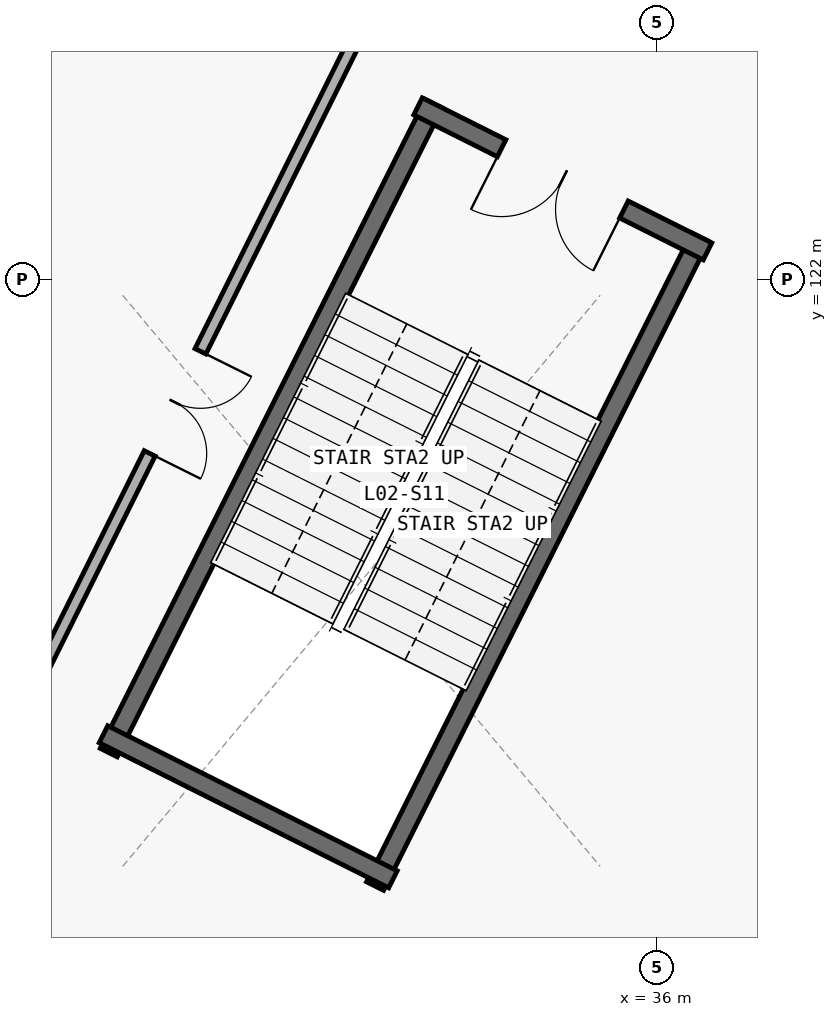
"""IFC4 building model, lengths in metres.
Left out: names, types, materials, properties, quantities, classifications, styles, units other than length and angle.
Written with IfcOpenShell. Run it as: python <this file> out.ifc"""

import sys

from ifc_helpers import new_model, si_unit, direction, frame, frame_2d, origin, place, context, subcontext, project, spatial, rectangle, extrude, element, fill, save


model = new_model("IFC4")
c1 = context("Model", 3, precision=1e-05, world=origin(), true_north=direction((0.0, 1.0)))
c2 = subcontext(c1, "Body", "Model", "MODEL_VIEW")
j1 = project(units=[si_unit("LENGTHUNIT", "METRE"), si_unit("PLANEANGLEUNIT", "RADIAN")], contexts=[c1])
p1 = place(None, origin())
s1 = spatial("IfcSite", under=j1, at=p1, CompositionType="ELEMENT")
p2 = place(p1, origin())
s2 = spatial("IfcBuilding", under=s1, at=p2, CompositionType="ELEMENT")
p3 = place(p2, frame((0.0, 0.0, 10.2)))
s3 = spatial("IfcBuildingStorey", under=s2, at=p3, CompositionType="ELEMENT", Elevation=10.2)
p4 = place(p3, frame((33.063, 124.313, 0.0), z_axis=(0.0, 0.0, 1.0), x_axis=(-0.447919041961, -0.894074119885, 0.0)))
e1 = element("IfcWall", 1, at=p4, inside=s3, PredefinedType="SHEAR", context=c2, shape_type="SweptSolid", body=[
    extrude(rectangle(XDim=9.55, YDim=0.25, at=frame_2d((4.775, 0.0))), origin(), (0.0, 0.0, 1.0), 4.5),
])
p5 = place(p3, frame((32.291, 114.019, 0.0), z_axis=(0.0, 0.0, 1.0), x_axis=(0.4479088042, 0.894079248792, 0.0)))
e2 = element("IfcWall", 2, at=p5, inside=s3, PredefinedType="SHEAR", context=c2, shape_type="SweptSolid", body=[
    extrude(rectangle(XDim=9.55, YDim=0.25, at=frame_2d((4.775, 0.0))), origin(), (0.0, 0.0, 1.0), 4.5),
])
p6 = place(p3, frame((36.664, 122.37, 0.0), z_axis=(0.0, 0.0, 1.0), x_axis=(-0.894071595331, 0.447924081092, 0.0)))
e3 = element("IfcWall", 3, at=p6, inside=s3, PredefinedType="SHEAR", context=c2, shape_type="SweptSolid", body=[
    extrude(rectangle(XDim=4.26, YDim=0.25, at=frame_2d((2.13, 0.0))), origin(), (0.0, 0.0, 1.0), 4.5),
])
p7 = place(p6, frame((1.23, 0.0, 0.0)))
e4 = element("IfcOpeningElement", 4, at=p7, cuts=e3, PredefinedType="OPENING", context=c2, shape_type="SweptSolid", body=[
    extrude(rectangle(XDim=1.8, YDim=2.25, at=frame_2d((0.9, 1.125))), frame((0.0, 0.135, 0.0), z_axis=(0.0, -1.0, 0.0), x_axis=(1.0, 0.0, 0.0)), (0.0, 0.0, 1.0), 0.27),
])
p8 = place(p3, frame((28.717, 116.016, 0.0), z_axis=(0.0, 0.0, 1.0), x_axis=(0.894083048484, -0.447901219481, 0.0)))
e5 = element("IfcWall", 5, at=p8, inside=s3, PredefinedType="SHEAR", context=c2, shape_type="SweptSolid", body=[
    extrude(rectangle(XDim=4.26, YDim=0.25, at=frame_2d((2.13, 0.0))), origin(), (0.0, 0.0, 1.0), 4.5),
])
p9 = place(p3, frame((33.934, 128.982, 0.0), z_axis=(0.0, 0.0, 1.0), x_axis=(-0.445193759993, -0.895434261162, 0.0)))
e6 = element("IfcWall", 6, at=p9, inside=s3, PredefinedType="PARTITIONING", context=c2, shape_type="SweptSolid", body=[
    extrude(rectangle(XDim=19.205, YDim=0.16, at=frame_2d((9.603, 0.0))), origin(), (0.0, 0.0, 1.0), 3.565),
])
p10 = place(p9, frame((8.853, 0.0, 0.0)))
e7 = element("IfcOpeningElement", 7, at=p10, cuts=e6, PredefinedType="OPENING", context=c2, shape_type="SweptSolid", body=[
    extrude(rectangle(XDim=1.5, YDim=2.15, at=frame_2d((0.75, 1.075))), frame((0.0, 0.09, 0.0), z_axis=(0.0, -1.0, 0.0), x_axis=(1.0, 0.0, 0.0)), (0.0, 0.0, 1.0), 0.18),
])
p11 = place(p7, origin())
e8 = element("IfcDoor", 8, at=p11, inside=s3, OperationType="DOUBLE_DOOR_SINGLE_SWING", PredefinedType="DOOR", context=c2, shape_type="SweptSolid", body=[
    extrude(rectangle(XDim=1.8, YDim=2.25, at=frame_2d((0.9, 1.125))), frame((0.0, 0.025, 0.0), z_axis=(0.0, -1.0, 0.0), x_axis=(1.0, 0.0, 0.0)), (0.0, 0.0, 1.0), 0.05),
])
fill(e4, e8)
p12 = place(p10, origin())
e9 = element("IfcDoor", 9, at=p12, inside=s3, OperationType="DOUBLE_DOOR_SINGLE_SWING", PredefinedType="DOOR", context=c2, shape_type="SweptSolid", body=[
    extrude(rectangle(XDim=1.5, YDim=2.15, at=frame_2d((0.75, 1.075))), frame((0.0, 0.025, 0.0), z_axis=(0.0, -1.0, 0.0), x_axis=(1.0, 0.0, 0.0)), (0.0, 0.0, 1.0), 0.05),
])
fill(e7, e9)
save(model, sys.argv[1])
